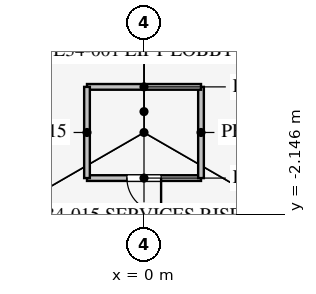
"""IFC4 building model, lengths in metres.
Left out: names, types, materials, properties, quantities, classifications, styles, units other than length and angle.
Written with IfcOpenShell. Run it as: python <this file> out.ifc"""

import sys

from ifc_helpers import new_model, si_unit, direction, frame, frame_2d, origin, place, context, subcontext, project, spatial, rectangle, extrude, element, fill, save


model = new_model("IFC4")
c1 = context("Model", 3, precision=1e-05, world=origin(), true_north=direction((0.0, 1.0)))
c2 = subcontext(c1, "Body", "Model", "MODEL_VIEW")
j1 = project(units=[si_unit("LENGTHUNIT", "METRE"), si_unit("PLANEANGLEUNIT", "RADIAN")], contexts=[c1])
p1 = place(None, origin())
s1 = spatial("IfcSite", under=j1, at=p1, CompositionType="ELEMENT")
p2 = place(p1, origin())
s2 = spatial("IfcBuilding", under=s1, at=p2, CompositionType="ELEMENT")
p3 = place(p2, frame((0.0, 0.0, 149.3)))
s3 = spatial("IfcBuildingStorey", under=s2, at=p3, CompositionType="ELEMENT", Elevation=149.3)
p4 = place(p3, frame((-1.5, -1.2, 0.0), z_axis=(0.0, 0.0, 1.0), x_axis=(1.0, 0.0, 0.0)))
e1 = element("IfcWall", 1, at=p4, inside=s3, PredefinedType="PARTITIONING", context=c2, shape_type="SweptSolid", body=[
    extrude(rectangle(XDim=3.0, YDim=0.15, at=frame_2d((1.5, 0.0))), origin(), (0.0, 0.0, 1.0), 4.0),
])
p5 = place(p4, frame((1.05, 0.0, 0.0)))
e2 = element("IfcOpeningElement", 2, at=p5, cuts=e1, PredefinedType="OPENING", context=c2, shape_type="SweptSolid", body=[
    extrude(rectangle(XDim=0.9, YDim=2.1, at=frame_2d((0.45, 1.05))), frame((0.0, 0.085, 0.0), z_axis=(0.0, -1.0, 0.0), x_axis=(1.0, 0.0, 0.0)), (0.0, 0.0, 1.0), 0.17),
])
p6 = place(p3, frame((1.5, -1.2, 0.0), z_axis=(0.0, 0.0, 1.0), x_axis=(0.0, 1.0, 0.0)))
e3 = element("IfcWall", 3, at=p6, inside=s3, PredefinedType="PARTITIONING", context=c2, shape_type="SweptSolid", body=[
    extrude(rectangle(XDim=2.4, YDim=0.15, at=frame_2d((1.2, 0.0))), origin(), (0.0, 0.0, 1.0), 4.0),
])
p7 = place(p3, frame((1.5, 1.2, 0.0), z_axis=(0.0, 0.0, 1.0), x_axis=(-1.0, 0.0, 0.0)))
e4 = element("IfcWall", 4, at=p7, inside=s3, PredefinedType="PARTITIONING", context=c2, shape_type="SweptSolid", body=[
    extrude(rectangle(XDim=3.0, YDim=0.15, at=frame_2d((1.5, 0.0))), origin(), (0.0, 0.0, 1.0), 4.0),
])
p8 = place(p3, frame((-1.5, 1.2, 0.0), z_axis=(0.0, 0.0, 1.0), x_axis=(0.0, -1.0, 0.0)))
e5 = element("IfcWall", 5, at=p8, inside=s3, PredefinedType="PARTITIONING", context=c2, shape_type="SweptSolid", body=[
    extrude(rectangle(XDim=2.4, YDim=0.15, at=frame_2d((1.2, 0.0))), origin(), (0.0, 0.0, 1.0), 4.0),
])
p9 = place(p3, frame((26.415, -15.231, 0.0), z_axis=(0.0, 0.0, 1.0), x_axis=(-0.50000091641, 0.866024874695, 0.0)))
e6 = element("IfcWall", 6, at=p9, inside=s3, PredefinedType="PARTITIONING", context=c2, shape_type="SweptSolid", body=[
    extrude(rectangle(XDim=52.796, YDim=0.12, at=frame_2d((26.398, 0.0))), origin(), (0.0, 0.0, 1.0), 2.9),
])
p10 = place(p9, frame((10.2, 0.0, 0.15)))
e7 = element("IfcOpeningElement", 7, at=p10, cuts=e6, PredefinedType="OPENING", context=c2, shape_type="SweptSolid", body=[
    extrude(rectangle(XDim=1.8, YDim=2.1, at=frame_2d((0.9, 1.05))), frame((0.0, 0.07, 0.0), z_axis=(0.0, -1.0, 0.0), x_axis=(1.0, 0.0, 0.0)), (0.0, 0.0, 1.0), 0.14),
])
p11 = place(p9, frame((40.8, 0.0, 0.15)))
e8 = element("IfcOpeningElement", 8, at=p11, cuts=e6, PredefinedType="OPENING", context=c2, shape_type="SweptSolid", body=[
    extrude(rectangle(XDim=1.8, YDim=2.1, at=frame_2d((0.9, 1.05))), frame((0.0, 0.07, 0.0), z_axis=(0.0, -1.0, 0.0), x_axis=(1.0, 0.0, 0.0)), (0.0, 0.0, 1.0), 0.14),
])
p12 = place(p3, frame((-0.016, 30.491, 0.0), z_axis=(0.0, 0.0, 1.0), x_axis=(-0.50000091641, -0.866024874695, 0.0)))
e9 = element("IfcWall", 9, at=p12, inside=s3, PredefinedType="PARTITIONING", context=c2, shape_type="SweptSolid", body=[
    extrude(rectangle(XDim=52.796, YDim=0.12, at=frame_2d((26.398, 0.0))), origin(), (0.0, 0.0, 1.0), 2.9),
])
p13 = place(p12, frame((10.2, 0.0, 0.15)))
e10 = element("IfcOpeningElement", 10, at=p13, cuts=e9, PredefinedType="OPENING", context=c2, shape_type="SweptSolid", body=[
    extrude(rectangle(XDim=1.8, YDim=2.1, at=frame_2d((0.9, 1.05))), frame((0.0, 0.07, 0.0), z_axis=(0.0, -1.0, 0.0), x_axis=(1.0, 0.0, 0.0)), (0.0, 0.0, 1.0), 0.14),
])
p14 = place(p12, frame((40.8, 0.0, 0.15)))
e11 = element("IfcOpeningElement", 11, at=p14, cuts=e9, PredefinedType="OPENING", context=c2, shape_type="SweptSolid", body=[
    extrude(rectangle(XDim=1.8, YDim=2.1, at=frame_2d((0.9, 1.05))), frame((0.0, 0.07, 0.0), z_axis=(0.0, -1.0, 0.0), x_axis=(1.0, 0.0, 0.0)), (0.0, 0.0, 1.0), 0.14),
])
p15 = place(p5, frame((0.9, 0.0, 0.0), z_axis=(0.0, 0.0, 1.0), x_axis=(-1.0, 0.0, 0.0)))
e12 = element("IfcDoor", 12, at=p15, inside=s3, OperationType="SINGLE_SWING_LEFT", PredefinedType="DOOR", context=c2, shape_type="SweptSolid", body=[
    extrude(rectangle(XDim=0.9, YDim=2.1, at=frame_2d((0.45, 1.05))), frame((0.0, 0.025, 0.0), z_axis=(0.0, -1.0, 0.0), x_axis=(1.0, 0.0, 0.0)), (0.0, 0.0, 1.0), 0.05),
])
fill(e2, e12)
save(model, sys.argv[1])
